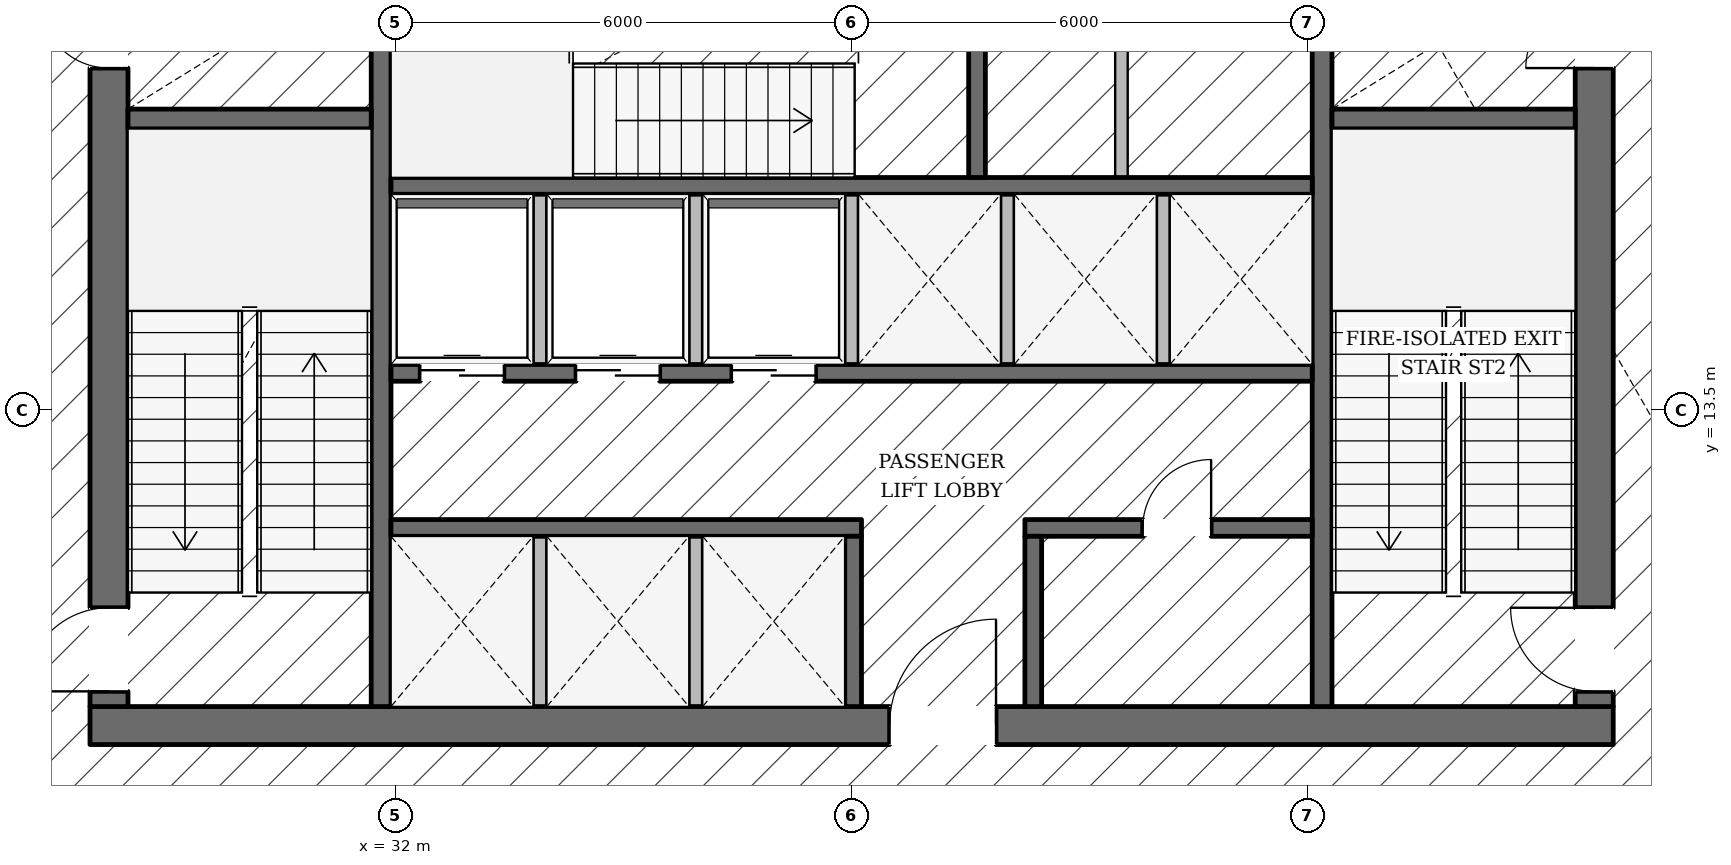
"""IFC4 building model, lengths in metres.
Left out: names, types, materials, properties, quantities, classifications, styles, units other than length and angle.
Written with IfcOpenShell. Run it as: python <this file> out.ifc"""

import sys

from ifc_helpers import new_model, si_unit, direction, frame, frame_2d, origin, place, context, subcontext, project, spatial, rectangle, extrude, element, fill, save


model = new_model("IFC4")
c1 = context("Model", 3, precision=1e-05, world=origin(), true_north=direction((0.0, 1.0)))
c2 = subcontext(c1, "Body", "Model", "MODEL_VIEW")
j1 = project(units=[si_unit("LENGTHUNIT", "METRE"), si_unit("PLANEANGLEUNIT", "RADIAN")], contexts=[c1])
p1 = place(None, origin())
s1 = spatial("IfcSite", under=j1, at=p1, CompositionType="ELEMENT")
p2 = place(p1, origin())
s2 = spatial("IfcBuilding", under=s1, at=p2, CompositionType="ELEMENT")
p3 = place(p2, frame((0.0, 0.0, 75.3)))
s3 = spatial("IfcBuildingStorey", under=s2, at=p3, CompositionType="ELEMENT", Elevation=75.3)
p4 = place(p3, frame((27.98, 9.35, 0.0), z_axis=(0.0, 0.0, 1.0), x_axis=(1.0, 0.0, 0.0)))
e1 = element("IfcWall", 1, at=p4, inside=s3, PredefinedType="SOLIDWALL", context=c2, shape_type="SweptSolid", body=[
    extrude(rectangle(XDim=20.04, YDim=0.5, at=frame_2d((10.02, 0.0))), origin(), (0.0, 0.0, 1.0), 4.985),
])
p5 = place(p4, frame((10.52, 0.0, 0.0)))
e2 = element("IfcOpeningElement", 2, at=p5, cuts=e1, PredefinedType="OPENING", context=c2, shape_type="SweptSolid", body=[
    extrude(rectangle(XDim=1.4, YDim=2.2, at=frame_2d((0.7, 1.1))), frame((0.0, 0.26, 0.0), z_axis=(0.0, -1.0, 0.0), x_axis=(1.0, 0.0, 0.0)), (0.0, 0.0, 1.0), 0.52),
])
p6 = place(p3, frame((28.23, 9.6, 0.0), z_axis=(0.0, 0.0, 1.0), x_axis=(0.0, 1.0, 0.0)))
e3 = element("IfcWall", 3, at=p6, inside=s3, PredefinedType="SOLIDWALL", context=c2, shape_type="SweptSolid", body=[
    extrude(rectangle(XDim=13.0, YDim=0.5, at=frame_2d((6.5, 0.0))), origin(), (0.0, 0.0, 1.0), 4.985),
])
p7 = place(p6, frame((0.2, 0.0, 0.0)))
e4 = element("IfcOpeningElement", 4, at=p7, cuts=e3, PredefinedType="OPENING", context=c2, shape_type="SweptSolid", body=[
    extrude(rectangle(XDim=1.1, YDim=2.15, at=frame_2d((0.55, 1.075))), frame((0.0, 0.26, 0.0), z_axis=(0.0, -1.0, 0.0), x_axis=(1.0, 0.0, 0.0)), (0.0, 0.0, 1.0), 0.52),
])
p8 = place(p6, frame((8.4, 0.0, 0.0)))
e5 = element("IfcOpeningElement", 5, at=p8, cuts=e3, PredefinedType="OPENING", context=c2, shape_type="SweptSolid", body=[
    extrude(rectangle(XDim=0.9, YDim=2.1, at=frame_2d((0.45, 1.05))), frame((0.0, 0.26, 0.0), z_axis=(0.0, -1.0, 0.0), x_axis=(1.0, 0.0, 0.0)), (0.0, 0.0, 1.0), 0.52),
])
p9 = place(p3, frame((47.77, 9.6, 0.0), z_axis=(0.0, 0.0, 1.0), x_axis=(0.0, 1.0, 0.0)))
e6 = element("IfcWall", 6, at=p9, inside=s3, PredefinedType="SOLIDWALL", context=c2, shape_type="SweptSolid", body=[
    extrude(rectangle(XDim=13.0, YDim=0.5, at=frame_2d((6.5, 0.0))), origin(), (0.0, 0.0, 1.0), 4.985),
])
p10 = place(p9, frame((0.2, 0.0, 0.0)))
e7 = element("IfcOpeningElement", 7, at=p10, cuts=e6, PredefinedType="OPENING", context=c2, shape_type="SweptSolid", body=[
    extrude(rectangle(XDim=1.1, YDim=2.15, at=frame_2d((0.55, 1.075))), frame((0.0, 0.26, 0.0), z_axis=(0.0, -1.0, 0.0), x_axis=(1.0, 0.0, 0.0)), (0.0, 0.0, 1.0), 0.52),
])
p11 = place(p9, frame((8.4, 0.0, 0.0)))
e8 = element("IfcOpeningElement", 8, at=p11, cuts=e6, PredefinedType="OPENING", context=c2, shape_type="SweptSolid", body=[
    extrude(rectangle(XDim=0.9, YDim=2.1, at=frame_2d((0.45, 1.05))), frame((0.0, 0.26, 0.0), z_axis=(0.0, -1.0, 0.0), x_axis=(1.0, 0.0, 0.0)), (0.0, 0.0, 1.0), 0.52),
])
p12 = place(p3, frame((31.81, 9.6, 0.0), z_axis=(0.0, 0.0, 1.0), x_axis=(0.0, 1.0, 0.0)))
e9 = element("IfcWall", 9, at=p12, inside=s3, PredefinedType="SHEAR", context=c2, shape_type="SweptSolid", body=[
    extrude(rectangle(XDim=13.0, YDim=0.26, at=frame_2d((6.5, 0.0))), origin(), (0.0, 0.0, 1.0), 4.985),
])
p13 = place(p12, frame((10.925, 0.0, 0.0)))
e10 = element("IfcOpeningElement", 10, at=p13, cuts=e9, PredefinedType="OPENING", context=c2, shape_type="SweptSolid", body=[
    extrude(rectangle(XDim=1.25, YDim=2.25, at=frame_2d((0.625, 1.125))), frame((0.0, 0.14, 0.0), z_axis=(0.0, -1.0, 0.0), x_axis=(1.0, 0.0, 0.0)), (0.0, 0.0, 1.0), 0.28),
])
p14 = place(p3, frame((44.19, 9.6, 0.0), z_axis=(0.0, 0.0, 1.0), x_axis=(0.0, 1.0, 0.0)))
e11 = element("IfcWall", 11, at=p14, inside=s3, PredefinedType="SHEAR", context=c2, shape_type="SweptSolid", body=[
    extrude(rectangle(XDim=13.0, YDim=0.26, at=frame_2d((6.5, 0.0))), origin(), (0.0, 0.0, 1.0), 4.985),
])
p15 = place(p14, frame((10.925, 0.0, 0.0)))
e12 = element("IfcOpeningElement", 12, at=p15, cuts=e11, PredefinedType="OPENING", context=c2, shape_type="SweptSolid", body=[
    extrude(rectangle(XDim=1.25, YDim=2.25, at=frame_2d((0.625, 1.125))), frame((0.0, 0.14, 0.0), z_axis=(0.0, -1.0, 0.0), x_axis=(1.0, 0.0, 0.0)), (0.0, 0.0, 1.0), 0.28),
])
for number, where, z_axis, x_axis in (
    (13, (28.48, 17.33, 0.0), (0.0, 0.0, 1.0), (1.0, 0.0, 0.0)),
    (14, (44.32, 17.33, 0.0), (0.0, 0.0, 1.0), (1.0, 0.0, 0.0)),
):
    element("IfcWall", number, at=place(p3, frame(where, z_axis=z_axis, x_axis=x_axis)), inside=s3, PredefinedType="SHEAR", context=c2, shape_type="SweptSolid", body=[
        extrude(rectangle(XDim=3.2, YDim=0.26, at=frame_2d((1.6, 0.0))), origin(), (0.0, 0.0, 1.0), 4.985),
    ])
p16 = place(p3, frame((31.94, 16.45, 0.0), z_axis=(0.0, 0.0, 1.0), x_axis=(1.0, 0.0, 0.0)))
e15 = element("IfcWall", 15, at=p16, inside=s3, PredefinedType="SOLIDWALL", context=c2, shape_type="SweptSolid", body=[
    extrude(rectangle(XDim=12.12, YDim=0.22, at=frame_2d((6.06, 0.0))), origin(), (0.0, 0.0, 1.0), 4.985),
])
p17 = place(p3, frame((39.65, 16.56, 0.0), z_axis=(0.0, 0.0, 1.0), x_axis=(0.0, 1.0, 0.0)))
e16 = element("IfcWall", 16, at=p17, inside=s3, PredefinedType="SOLIDWALL", context=c2, shape_type="SweptSolid", body=[
    extrude(rectangle(XDim=3.2, YDim=0.22, at=frame_2d((1.6, 0.0))), origin(), (0.0, 0.0, 1.0), 4.985),
])
p18 = place(p3, frame((31.94, 13.99, 0.0), z_axis=(0.0, 0.0, 1.0), x_axis=(1.0, 0.0, 0.0)))
e17 = element("IfcWall", 17, at=p18, inside=s3, PredefinedType="SOLIDWALL", context=c2, shape_type="SweptSolid", body=[
    extrude(rectangle(XDim=12.12, YDim=0.22, at=frame_2d((6.06, 0.0))), origin(), (0.0, 0.0, 1.0), 4.985),
])
p19 = place(p18, frame((0.385, 0.0, 0.0)))
e18 = element("IfcOpeningElement", 18, at=p19, cuts=e17, PredefinedType="OPENING", context=c2, shape_type="SweptSolid", body=[
    extrude(rectangle(XDim=1.1, YDim=2.2, at=frame_2d((0.55, 1.1))), frame((0.0, 0.12, 0.0), z_axis=(0.0, -1.0, 0.0), x_axis=(1.0, 0.0, 0.0)), (0.0, 0.0, 1.0), 0.24),
])
p20 = place(p18, frame((2.435, 0.0, 0.0)))
e19 = element("IfcOpeningElement", 19, at=p20, cuts=e17, PredefinedType="OPENING", context=c2, shape_type="SweptSolid", body=[
    extrude(rectangle(XDim=1.1, YDim=2.2, at=frame_2d((0.55, 1.1))), frame((0.0, 0.12, 0.0), z_axis=(0.0, -1.0, 0.0), x_axis=(1.0, 0.0, 0.0)), (0.0, 0.0, 1.0), 0.24),
])
p21 = place(p18, frame((4.485, 0.0, 0.0)))
e20 = element("IfcOpeningElement", 20, at=p21, cuts=e17, PredefinedType="OPENING", context=c2, shape_type="SweptSolid", body=[
    extrude(rectangle(XDim=1.1, YDim=2.2, at=frame_2d((0.55, 1.1))), frame((0.0, 0.12, 0.0), z_axis=(0.0, -1.0, 0.0), x_axis=(1.0, 0.0, 0.0)), (0.0, 0.0, 1.0), 0.24),
])
p22 = place(p3, frame((31.94, 11.95, 0.0), z_axis=(0.0, 0.0, 1.0), x_axis=(1.0, 0.0, 0.0)))
e21 = element("IfcWall", 21, at=p22, inside=s3, PredefinedType="SOLIDWALL", context=c2, shape_type="SweptSolid", body=[
    extrude(rectangle(XDim=6.19, YDim=0.22, at=frame_2d((3.095, 0.0))), origin(), (0.0, 0.0, 1.0), 4.985),
])
p23 = place(p3, frame((40.28, 11.95, 0.0), z_axis=(0.0, 0.0, 1.0), x_axis=(1.0, 0.0, 0.0)))
e22 = element("IfcWall", 22, at=p23, inside=s3, PredefinedType="SOLIDWALL", context=c2, shape_type="SweptSolid", body=[
    extrude(rectangle(XDim=3.78, YDim=0.22, at=frame_2d((1.89, 0.0))), origin(), (0.0, 0.0, 1.0), 4.985),
])
p24 = place(p23, frame((1.55, 0.0, 0.0)))
e23 = element("IfcOpeningElement", 23, at=p24, cuts=e22, PredefinedType="OPENING", context=c2, shape_type="SweptSolid", body=[
    extrude(rectangle(XDim=0.9, YDim=2.1, at=frame_2d((0.45, 1.05))), frame((0.0, 0.12, 0.0), z_axis=(0.0, -1.0, 0.0), x_axis=(1.0, 0.0, 0.0)), (0.0, 0.0, 1.0), 0.24),
])
for number, where, z_axis, x_axis in (
    (24, (38.02, 9.6, 0.0), (0.0, 0.0, 1.0), (0.0, 1.0, 0.0)),
    (25, (40.39, 9.6, 0.0), (0.0, 0.0, 1.0), (0.0, 1.0, 0.0)),
):
    element("IfcWall", number, at=place(p3, frame(where, z_axis=z_axis, x_axis=x_axis)), inside=s3, PredefinedType="SOLIDWALL", context=c2, shape_type="SweptSolid", body=[
        extrude(rectangle(XDim=2.24, YDim=0.22, at=frame_2d((1.12, 0.0))), origin(), (0.0, 0.0, 1.0), 4.985),
    ])
p25 = place(p3, frame((13.665, 13.524, 0.0), z_axis=(0.0, 0.0, 1.0), x_axis=(0.50295003743, 0.864315486295, 0.0)))
e26 = element("IfcWall", 26, at=p25, inside=s3, PredefinedType="STANDARD", context=c2, shape_type="SweptSolid", body=[
    extrude(rectangle(XDim=35.184, YDim=0.32, at=frame_2d((17.592, 0.0))), origin(), (0.0, 0.0, 1.0), 3.677),
])
p26 = place(p3, frame((44.478, 44.029, 0.0), z_axis=(0.0, 0.0, 1.0), x_axis=(0.497006709314, -0.867746697428, 0.0)))
e27 = element("IfcWall", 27, at=p26, inside=s3, PredefinedType="STANDARD", context=c2, shape_type="SweptSolid", body=[
    extrude(rectangle(XDim=34.773, YDim=0.32, at=frame_2d((17.386, 0.0))), origin(), (0.0, 0.0, 1.0), 3.677),
])
p27 = place(p3, frame((30.821, 44.822, 0.0), z_axis=(0.0, 0.0, 1.0), x_axis=(-0.504421897802, -0.863457323218, 0.0)))
e28 = element("IfcWall", 28, at=p27, inside=s3, PredefinedType="PARAPET", context=c2, shape_type="SweptSolid", body=[
    extrude(rectangle(XDim=36.395, YDim=0.24, at=frame_2d((18.197, 0.0))), origin(), (0.0, 0.0, 1.0), 1.25),
])
p28 = place(p3, frame((63.012, 13.699, 0.0), z_axis=(0.0, 0.0, 1.0), x_axis=(-0.499261971682, 0.866451085539, 0.0)))
e29 = element("IfcWall", 29, at=p28, inside=s3, PredefinedType="PARAPET", context=c2, shape_type="SweptSolid", body=[
    extrude(rectangle(XDim=36.021, YDim=0.24, at=frame_2d((18.01, 0.0))), origin(), (0.0, 0.0, 1.0), 1.25),
])
for number, where, z_axis, x_axis in (
    (30, (33.9, 9.55, 0.0), (0.0, 0.0, 1.0), (0.0, 1.0, 0.0)),
    (31, (35.95, 9.55, 0.0), (0.0, 0.0, 1.0), (0.0, 1.0, 0.0)),
):
    element("IfcWall", number, at=place(p3, frame(where, z_axis=z_axis, x_axis=x_axis)), inside=s3, PredefinedType="PARTITIONING", context=c2, shape_type="SweptSolid", body=[
        extrude(rectangle(XDim=2.29, YDim=0.165, at=frame_2d((1.145, 0.0))), origin(), (0.0, 0.0, 1.0), 4.985),
    ])
for number, where, z_axis, x_axis in (
    (32, (33.9, 14.1, 0.0), (0.0, 0.0, 1.0), (0.0, 1.0, 0.0)),
    (33, (35.95, 14.1, 0.0), (0.0, 0.0, 1.0), (0.0, 1.0, 0.0)),
    (34, (38.0, 14.1, 0.0), (0.0, 0.0, 1.0), (0.0, 1.0, 0.0)),
    (35, (40.05, 14.1, 0.0), (0.0, 0.0, 1.0), (0.0, 1.0, 0.0)),
    (36, (42.1, 14.1, 0.0), (0.0, 0.0, 1.0), (0.0, 1.0, 0.0)),
):
    element("IfcWall", number, at=place(p3, frame(where, z_axis=z_axis, x_axis=x_axis)), inside=s3, PredefinedType="PARTITIONING", context=c2, shape_type="SweptSolid", body=[
        extrude(rectangle(XDim=2.24, YDim=0.165, at=frame_2d((1.12, 0.0))), origin(), (0.0, 0.0, 1.0), 4.985),
    ])
p29 = place(p3, frame((41.55, 16.56, 0.0), z_axis=(0.0, 0.0, 1.0), x_axis=(0.0, 1.0, 0.0)))
e37 = element("IfcWall", 37, at=p29, inside=s3, PredefinedType="PARTITIONING", context=c2, shape_type="SweptSolid", body=[
    extrude(rectangle(XDim=3.2, YDim=0.165, at=frame_2d((1.6, 0.0))), origin(), (0.0, 0.0, 1.0), 4.985),
])
p30 = place(p7, origin())
e38 = element("IfcDoor", 38, at=p30, inside=s3, OperationType="SINGLE_SWING_LEFT", PredefinedType="DOOR", context=c2, shape_type="SweptSolid", body=[
    extrude(rectangle(XDim=1.1, YDim=2.15, at=frame_2d((0.55, 1.075))), frame((0.0, 0.025, 0.0), z_axis=(0.0, -1.0, 0.0), x_axis=(1.0, 0.0, 0.0)), (0.0, 0.0, 1.0), 0.05),
])
fill(e4, e38)
p31 = place(p10, origin())
e39 = element("IfcDoor", 39, at=p31, inside=s3, OperationType="SINGLE_SWING_RIGHT", PredefinedType="DOOR", context=c2, shape_type="SweptSolid", body=[
    extrude(rectangle(XDim=1.1, YDim=2.15, at=frame_2d((0.55, 1.075))), frame((0.0, 0.025, 0.0), z_axis=(0.0, -1.0, 0.0), x_axis=(1.0, 0.0, 0.0)), (0.0, 0.0, 1.0), 0.05),
])
fill(e7, e39)
p32 = place(p8, origin())
e40 = element("IfcDoor", 40, at=p32, inside=s3, OperationType="SINGLE_SWING_RIGHT", PredefinedType="DOOR", context=c2, shape_type="SweptSolid", body=[
    extrude(rectangle(XDim=0.9, YDim=2.1, at=frame_2d((0.45, 1.05))), frame((0.0, 0.025, 0.0), z_axis=(0.0, -1.0, 0.0), x_axis=(1.0, 0.0, 0.0)), (0.0, 0.0, 1.0), 0.05),
])
fill(e5, e40)
p33 = place(p11, origin())
e41 = element("IfcDoor", 41, at=p33, inside=s3, OperationType="SINGLE_SWING_LEFT", PredefinedType="DOOR", context=c2, shape_type="SweptSolid", body=[
    extrude(rectangle(XDim=0.9, YDim=2.1, at=frame_2d((0.45, 1.05))), frame((0.0, 0.025, 0.0), z_axis=(0.0, -1.0, 0.0), x_axis=(1.0, 0.0, 0.0)), (0.0, 0.0, 1.0), 0.05),
])
fill(e8, e41)
p34 = place(p5, origin())
e42 = element("IfcDoor", 42, at=p34, inside=s3, OperationType="SINGLE_SWING_RIGHT", PredefinedType="DOOR", context=c2, shape_type="SweptSolid", body=[
    extrude(rectangle(XDim=1.4, YDim=2.2, at=frame_2d((0.7, 1.1))), frame((0.0, 0.025, 0.0), z_axis=(0.0, -1.0, 0.0), x_axis=(1.0, 0.0, 0.0)), (0.0, 0.0, 1.0), 0.05),
])
fill(e2, e42)
p35 = place(p19, origin())
e43 = element("IfcDoor", 43, at=p35, inside=s3, OperationType="DOUBLE_DOOR_SLIDING", PredefinedType="DOOR", context=c2, shape_type="SweptSolid", body=[
    extrude(rectangle(XDim=1.1, YDim=2.2, at=frame_2d((0.55, 1.1))), frame((0.0, 0.025, 0.0), z_axis=(0.0, -1.0, 0.0), x_axis=(1.0, 0.0, 0.0)), (0.0, 0.0, 1.0), 0.05),
])
fill(e18, e43)
p36 = place(p20, origin())
e44 = element("IfcDoor", 44, at=p36, inside=s3, OperationType="DOUBLE_DOOR_SLIDING", PredefinedType="DOOR", context=c2, shape_type="SweptSolid", body=[
    extrude(rectangle(XDim=1.1, YDim=2.2, at=frame_2d((0.55, 1.1))), frame((0.0, 0.025, 0.0), z_axis=(0.0, -1.0, 0.0), x_axis=(1.0, 0.0, 0.0)), (0.0, 0.0, 1.0), 0.05),
])
fill(e19, e44)
p37 = place(p21, origin())
e45 = element("IfcDoor", 45, at=p37, inside=s3, OperationType="DOUBLE_DOOR_SLIDING", PredefinedType="DOOR", context=c2, shape_type="SweptSolid", body=[
    extrude(rectangle(XDim=1.1, YDim=2.2, at=frame_2d((0.55, 1.1))), frame((0.0, 0.025, 0.0), z_axis=(0.0, -1.0, 0.0), x_axis=(1.0, 0.0, 0.0)), (0.0, 0.0, 1.0), 0.05),
])
fill(e20, e45)
p38 = place(p24, origin())
e46 = element("IfcDoor", 46, at=p38, inside=s3, OperationType="SINGLE_SWING_RIGHT", PredefinedType="DOOR", context=c2, shape_type="SweptSolid", body=[
    extrude(rectangle(XDim=0.9, YDim=2.1, at=frame_2d((0.45, 1.05))), frame((0.0, 0.025, 0.0), z_axis=(0.0, -1.0, 0.0), x_axis=(1.0, 0.0, 0.0)), (0.0, 0.0, 1.0), 0.05),
])
fill(e23, e46)
save(model, sys.argv[1])
